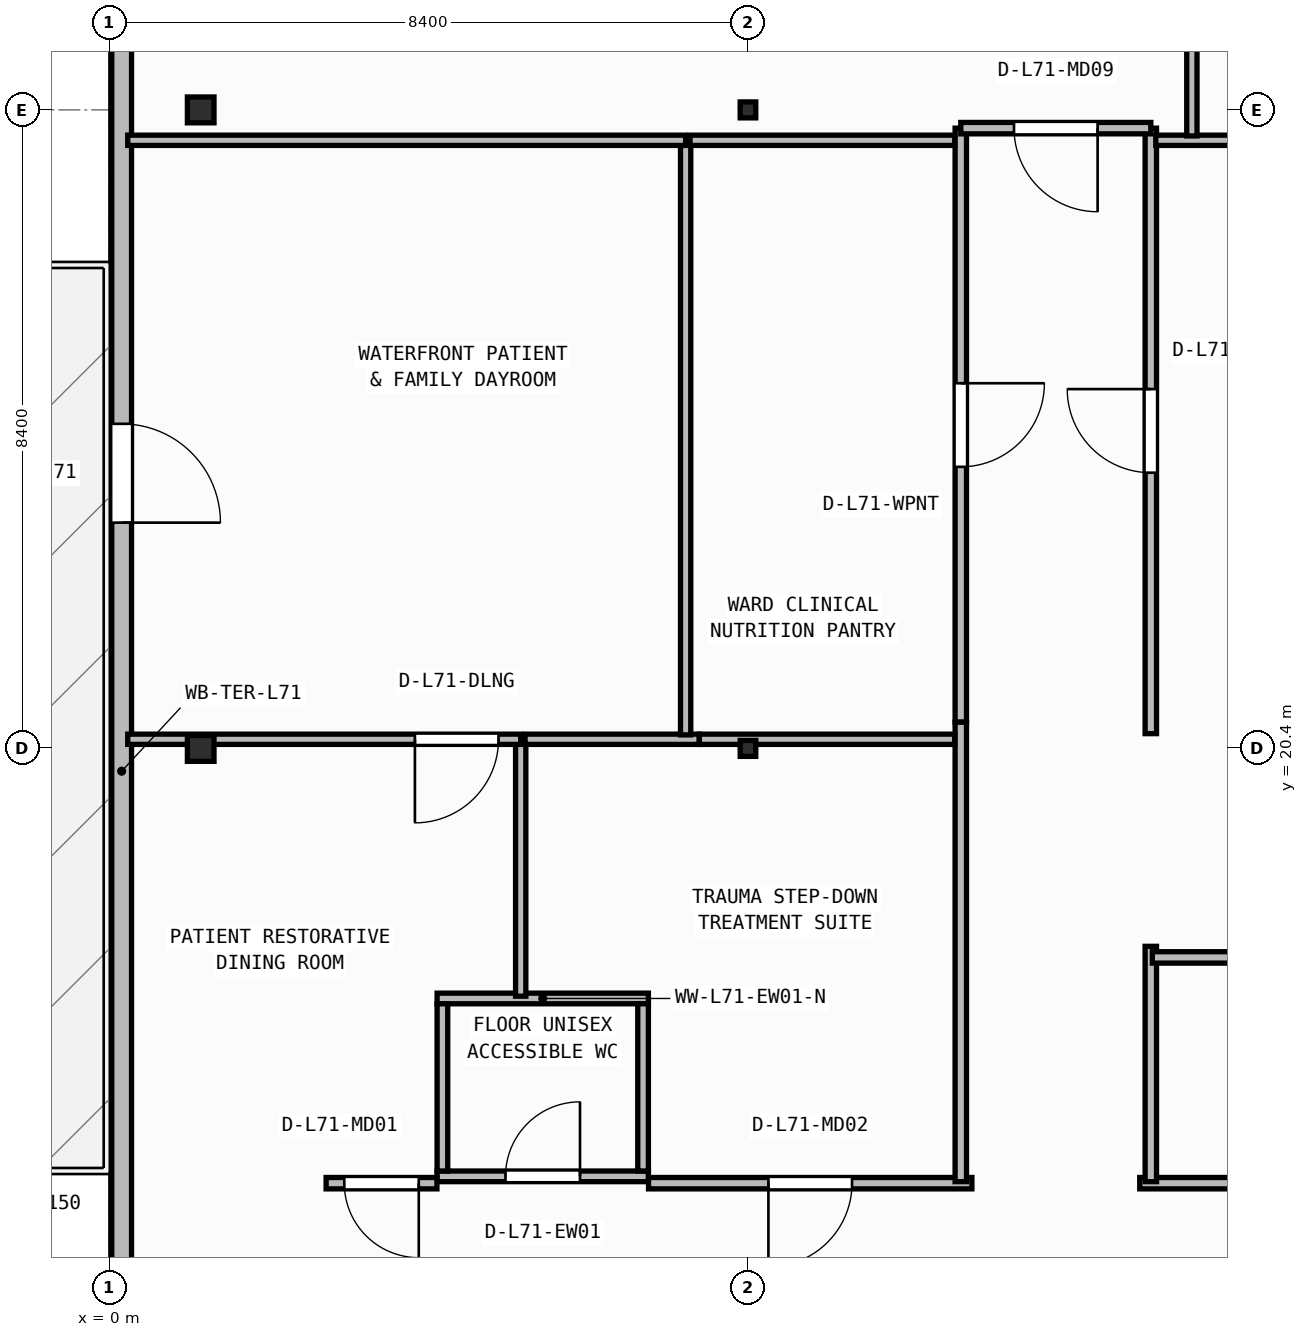
"""IFC4 building model, lengths in metres.
Left out: names, types, materials, properties, quantities, classifications, styles, units other than length and angle.
Written with IfcOpenShell. Run it as: python <this file> out.ifc"""

import sys

from ifc_helpers import new_model, si_unit, direction, frame, frame_2d, origin, origin_2d, place, context, subcontext, project, spatial, rectangle, i_section, extrude, element, fill, save


model = new_model("IFC4")
c1 = context("Model", 3, precision=1e-05, world=origin(), true_north=direction((0.0, 1.0)))
c2 = subcontext(c1, "Body", "Model", "MODEL_VIEW")
j1 = project(units=[si_unit("LENGTHUNIT", "METRE"), si_unit("PLANEANGLEUNIT", "RADIAN")], contexts=[c1])
p1 = place(None, origin())
s1 = spatial("IfcSite", under=j1, at=p1, CompositionType="ELEMENT")
p2 = place(p1, origin())
s2 = spatial("IfcBuilding", under=s1, at=p2, CompositionType="ELEMENT")
p3 = place(p2, frame((0.0, 0.0, 288.15)))
s3 = spatial("IfcBuildingStorey", under=s2, at=p3, CompositionType="ELEMENT", Elevation=288.15)
p4 = place(p3, frame((1.2, 20.4, 0.0), z_axis=(0.0, 0.0, 1.0), x_axis=(1.0, 0.0, 0.0)))
e1 = element("IfcColumn", 1, at=p4, inside=s3, PredefinedType="COLUMN", context=c2, shape_type="SweptSolid", body=[
    extrude(i_section(OverallWidth=0.35, OverallDepth=0.34, WebThickness=0.016, FlangeThickness=0.028, at=origin_2d()), origin(), (0.0, 0.0, 1.0), 3.95),
])
p5 = place(p3, frame((8.4, 20.4, 0.0), z_axis=(0.0, 0.0, 1.0), x_axis=(1.0, 0.0, 0.0)))
e2 = element("IfcColumn", 2, at=p5, inside=s3, PredefinedType="COLUMN", context=c2, shape_type="SweptSolid", body=[
    extrude(i_section(OverallWidth=0.205, OverallDepth=0.21, WebThickness=0.009, FlangeThickness=0.014, FilletRadius=0.011, at=origin_2d()), origin(), (0.0, 0.0, 1.0), 3.95),
])
p6 = place(p3, frame((1.2, 28.8, 0.0), z_axis=(0.0, 0.0, 1.0), x_axis=(1.0, 0.0, 0.0)))
e3 = element("IfcColumn", 3, at=p6, inside=s3, PredefinedType="COLUMN", context=c2, shape_type="SweptSolid", body=[
    extrude(i_section(OverallWidth=0.35, OverallDepth=0.34, WebThickness=0.016, FlangeThickness=0.028, at=origin_2d()), origin(), (0.0, 0.0, 1.0), 3.95),
])
p7 = place(p3, frame((8.4, 28.8, 0.0), z_axis=(0.0, 0.0, 1.0), x_axis=(1.0, 0.0, 0.0)))
e4 = element("IfcColumn", 4, at=p7, inside=s3, PredefinedType="COLUMN", context=c2, shape_type="SweptSolid", body=[
    extrude(i_section(OverallWidth=0.205, OverallDepth=0.21, WebThickness=0.009, FlangeThickness=0.014, FilletRadius=0.011, at=origin_2d()), origin(), (0.0, 0.0, 1.0), 3.95),
])
p8 = place(p3, frame((0.16, 37.74, 0.0), z_axis=(0.0, 0.0, 1.0), x_axis=(0.0, -1.0, 0.0)))
e5 = element("IfcWall", 5, at=p8, inside=s3, PredefinedType="STANDARD", context=c2, shape_type="SweptSolid", body=[
    extrude(rectangle(XDim=35.28, YDim=0.26, at=frame_2d((17.64, 0.0))), origin(), (0.0, 0.0, 1.0), 3.71),
])
p9 = place(p8, frame((13.07, 0.0, 0.0)))
e6 = element("IfcOpeningElement", 6, at=p9, cuts=e5, PredefinedType="OPENING", context=c2, shape_type="SweptSolid", body=[
    extrude(rectangle(XDim=1.3, YDim=2.15, at=frame_2d((0.65, 1.075))), frame((0.0, 0.14, 0.0), z_axis=(0.0, -1.0, 0.0), x_axis=(1.0, 0.0, 0.0)), (0.0, 0.0, 1.0), 0.28),
])
p10 = place(p3, frame((4.31, 14.77, 0.0), z_axis=(0.0, 0.0, 1.0), x_axis=(1.0, 0.0, 0.0)))
e7 = element("IfcWall", 7, at=p10, inside=s3, PredefinedType="PARTITIONING", context=c2, shape_type="SweptSolid", body=[
    extrude(rectangle(XDim=2.78, YDim=0.14, at=frame_2d((1.39, 0.0))), origin(), (0.0, 0.0, 1.0), 3.71),
])
p11 = place(p10, frame((0.9, 0.0, 0.0)))
e8 = element("IfcOpeningElement", 8, at=p11, cuts=e7, PredefinedType="OPENING", context=c2, shape_type="SweptSolid", body=[
    extrude(rectangle(XDim=0.98, YDim=2.1, at=frame_2d((0.49, 1.05))), frame((0.0, 0.08, 0.0), z_axis=(0.0, -1.0, 0.0), x_axis=(1.0, 0.0, 0.0)), (0.0, 0.0, 1.0), 0.16),
])
p12 = place(p3, frame((4.31, 17.11, 0.0), z_axis=(0.0, 0.0, 1.0), x_axis=(1.0, 0.0, 0.0)))
e9 = element("IfcWall", 9, at=p12, inside=s3, PredefinedType="PARTITIONING", context=c2, shape_type="SweptSolid", body=[
    extrude(rectangle(XDim=2.78, YDim=0.14, at=frame_2d((1.39, 0.0))), origin(), (0.0, 0.0, 1.0), 3.71),
])
for number, where, z_axis, x_axis in (
    (10, (4.38, 14.84, 0.0), (0.0, 0.0, 1.0), (0.0, 1.0, 0.0)),
    (11, (7.02, 14.84, 0.0), (0.0, 0.0, 1.0), (0.0, 1.0, 0.0)),
):
    element("IfcWall", number, at=place(p3, frame(where, z_axis=z_axis, x_axis=x_axis)), inside=s3, PredefinedType="PARTITIONING", context=c2, shape_type="SweptSolid", body=[
        extrude(rectangle(XDim=2.2, YDim=0.14, at=frame_2d((1.1, 0.0))), origin(), (0.0, 0.0, 1.0), 3.71),
    ])
p13 = place(p3, frame((4.308, 14.68, 0.0), z_axis=(0.0, 0.0, 1.0), x_axis=(-1.0, 0.0, 0.0)))
e12 = element("IfcWall", 12, at=p13, inside=s3, PredefinedType="PARTITIONING", context=c2, shape_type="SweptSolid", body=[
    extrude(rectangle(XDim=1.458, YDim=0.15, at=frame_2d((0.729, 0.0))), origin(), (0.0, 0.0, 1.0), 3.71),
])
p14 = place(p13, frame((0.239, 0.0, 0.0)))
e13 = element("IfcOpeningElement", 13, at=p14, cuts=e12, PredefinedType="OPENING", context=c2, shape_type="SweptSolid", body=[
    extrude(rectangle(XDim=0.98, YDim=2.1, at=frame_2d((0.49, 1.05))), frame((0.0, 0.085, 0.0), z_axis=(0.0, -1.0, 0.0), x_axis=(1.0, 0.0, 0.0)), (0.0, 0.0, 1.0), 0.17),
])
p15 = place(p3, frame((11.346, 14.68, 0.0), z_axis=(0.0, 0.0, 1.0), x_axis=(-1.0, 0.0, 0.0)))
e14 = element("IfcWall", 14, at=p15, inside=s3, PredefinedType="PARTITIONING", context=c2, shape_type="SweptSolid", body=[
    extrude(rectangle(XDim=4.254, YDim=0.15, at=frame_2d((2.127, 0.0))), origin(), (0.0, 0.0, 1.0), 3.71),
])
p16 = place(p15, frame((1.577, 0.0, 0.0)))
e15 = element("IfcOpeningElement", 15, at=p16, cuts=e14, PredefinedType="OPENING", context=c2, shape_type="SweptSolid", body=[
    extrude(rectangle(XDim=1.1, YDim=2.1, at=frame_2d((0.55, 1.05))), frame((0.0, 0.085, 0.0), z_axis=(0.0, -1.0, 0.0), x_axis=(1.0, 0.0, 0.0)), (0.0, 0.0, 1.0), 0.17),
])
p17 = place(p3, frame((19.906, 14.68, 0.0), z_axis=(0.0, 0.0, 1.0), x_axis=(-1.0, 0.0, 0.0)))
e16 = element("IfcWall", 16, at=p17, inside=s3, PredefinedType="PARTITIONING", context=c2, shape_type="SweptSolid", body=[
    extrude(rectangle(XDim=6.352, YDim=0.15, at=frame_2d((3.176, 0.0))), origin(), (0.0, 0.0, 1.0), 3.71),
])
p18 = place(p17, frame((2.626, 0.0, 0.0)))
e17 = element("IfcOpeningElement", 17, at=p18, cuts=e16, PredefinedType="OPENING", context=c2, shape_type="SweptSolid", body=[
    extrude(rectangle(XDim=1.1, YDim=2.1, at=frame_2d((0.55, 1.05))), frame((0.0, 0.085, 0.0), z_axis=(0.0, -1.0, 0.0), x_axis=(1.0, 0.0, 0.0)), (0.0, 0.0, 1.0), 0.17),
])
p19 = place(p3, frame((11.2, 20.746, 0.0), z_axis=(0.0, 0.0, 1.0), x_axis=(0.0, -1.0, 0.0)))
e18 = element("IfcWall", 18, at=p19, inside=s3, PredefinedType="PARTITIONING", context=c2, shape_type="SweptSolid", body=[
    extrude(rectangle(XDim=6.046, YDim=0.15, at=frame_2d((3.023, 0.0))), origin(), (0.0, 0.0, 1.0), 3.71),
])
p20 = place(p3, frame((13.7, 14.7, 0.0), z_axis=(0.0, 0.0, 1.0), x_axis=(0.0, 1.0, 0.0)))
e19 = element("IfcWall", 19, at=p20, inside=s3, PredefinedType="PARTITIONING", context=c2, shape_type="SweptSolid", body=[
    extrude(rectangle(XDim=3.096, YDim=0.15, at=frame_2d((1.548, 0.0))), origin(), (0.0, 0.0, 1.0), 3.71),
])
p21 = place(p3, frame((11.2, 28.56, 0.0), z_axis=(0.0, 0.0, 1.0), x_axis=(0.0, -1.0, 0.0)))
e20 = element("IfcWall", 20, at=p21, inside=s3, PredefinedType="PARTITIONING", context=c2, shape_type="SweptSolid", body=[
    extrude(rectangle(XDim=7.812, YDim=0.15, at=frame_2d((3.906, 0.0))), origin(), (0.0, 0.0, 1.0), 3.71),
])
p22 = place(p21, frame((3.356, 0.0, 0.0)))
e21 = element("IfcOpeningElement", 21, at=p22, cuts=e20, PredefinedType="OPENING", context=c2, shape_type="SweptSolid", body=[
    extrude(rectangle(XDim=1.1, YDim=2.1, at=frame_2d((0.55, 1.05))), frame((0.0, 0.085, 0.0), z_axis=(0.0, -1.0, 0.0), x_axis=(1.0, 0.0, 0.0)), (0.0, 0.0, 1.0), 0.17),
])
p23 = place(p3, frame((13.7, 20.594, 0.0), z_axis=(0.0, 0.0, 1.0), x_axis=(0.0, 1.0, 0.0)))
e22 = element("IfcWall", 22, at=p23, inside=s3, PredefinedType="PARTITIONING", context=c2, shape_type="SweptSolid", body=[
    extrude(rectangle(XDim=7.966, YDim=0.15, at=frame_2d((3.983, 0.0))), origin(), (0.0, 0.0, 1.0), 3.71),
])
p24 = place(p23, frame((3.433, 0.0, 0.0)))
e23 = element("IfcOpeningElement", 23, at=p24, cuts=e22, PredefinedType="OPENING", context=c2, shape_type="SweptSolid", body=[
    extrude(rectangle(XDim=1.1, YDim=2.1, at=frame_2d((0.55, 1.05))), frame((0.0, 0.085, 0.0), z_axis=(0.0, -1.0, 0.0), x_axis=(1.0, 0.0, 0.0)), (0.0, 0.0, 1.0), 0.17),
])
p25 = place(p3, frame((13.7, 28.56, 0.0), z_axis=(0.0, 0.0, 1.0), x_axis=(-1.0, 0.0, 0.0)))
e24 = element("IfcWall", 24, at=p25, inside=s3, PredefinedType="PARTITIONING", context=c2, shape_type="SweptSolid", body=[
    extrude(rectangle(XDim=2.5, YDim=0.15, at=frame_2d((1.25, 0.0))), origin(), (0.0, 0.0, 1.0), 3.157),
])
p26 = place(p25, frame((0.7, 0.0, 0.0)))
e25 = element("IfcOpeningElement", 25, at=p26, cuts=e24, PredefinedType="OPENING", context=c2, shape_type="SweptSolid", body=[
    extrude(rectangle(XDim=1.1, YDim=2.1, at=frame_2d((0.55, 1.05))), frame((0.0, 0.085, 0.0), z_axis=(0.0, -1.0, 0.0), x_axis=(1.0, 0.0, 0.0)), (0.0, 0.0, 1.0), 0.17),
])
p27 = place(p3, frame((13.72, 17.65, 0.0), z_axis=(0.0, 0.0, 1.0), x_axis=(1.0, 0.0, 0.0)))
e26 = element("IfcWall", 26, at=p27, inside=s3, PredefinedType="PARTITIONING", context=c2, shape_type="SweptSolid", body=[
    extrude(rectangle(XDim=6.186, YDim=0.15, at=frame_2d((3.093, 0.0))), origin(), (0.0, 0.0, 1.0), 3.71),
])
p28 = place(p3, frame((5.41, 17.14, 0.0), z_axis=(0.0, 0.0, 1.0), x_axis=(0.0, 1.0, 0.0)))
e27 = element("IfcWall", 27, at=p28, inside=s3, PredefinedType="PARTITIONING", context=c2, shape_type="SweptSolid", body=[
    extrude(rectangle(XDim=3.38, YDim=0.135, at=frame_2d((1.69, 0.0))), origin(), (0.0, 0.0, 1.0), 3.71),
])
p29 = place(p3, frame((5.41, 20.52, 0.0), z_axis=(0.0, 0.0, 1.0), x_axis=(-1.0, 0.0, 0.0)))
e28 = element("IfcWall", 28, at=p29, inside=s3, PredefinedType="PARTITIONING", context=c2, shape_type="SweptSolid", body=[
    extrude(rectangle(XDim=5.17, YDim=0.135, at=frame_2d((2.585, 0.0))), origin(), (0.0, 0.0, 1.0), 3.157),
])
p30 = place(p29, frame((0.292, 0.0, 0.0)))
e29 = element("IfcOpeningElement", 29, at=p30, cuts=e28, PredefinedType="OPENING", context=c2, shape_type="SweptSolid", body=[
    extrude(rectangle(XDim=1.1, YDim=2.1, at=frame_2d((0.55, 1.05))), frame((0.0, 0.077, 0.0), z_axis=(0.0, -1.0, 0.0), x_axis=(1.0, 0.0, 0.0)), (0.0, 0.0, 1.0), 0.155),
])
p31 = place(p3, frame((7.759, 20.52, 0.0), z_axis=(0.0, 0.0, 1.0), x_axis=(-1.0, 0.0, 0.0)))
e30 = element("IfcWall", 30, at=p31, inside=s3, PredefinedType="PARTITIONING", context=c2, shape_type="SweptSolid", body=[
    extrude(rectangle(XDim=2.291, YDim=0.135, at=frame_2d((1.146, 0.0))), origin(), (0.0, 0.0, 1.0), 3.157),
])
p32 = place(p3, frame((11.12, 20.52, 0.0), z_axis=(0.0, 0.0, 1.0), x_axis=(-1.0, 0.0, 0.0)))
e31 = element("IfcWall", 31, at=p32, inside=s3, PredefinedType="PARTITIONING", context=c2, shape_type="SweptSolid", body=[
    extrude(rectangle(XDim=3.36, YDim=0.135, at=frame_2d((1.68, 0.0))), origin(), (0.0, 0.0, 1.0), 3.157),
])
p33 = place(p3, frame((7.58, 20.577, 0.0), z_axis=(0.0, 0.0, 1.0), x_axis=(0.0, 1.0, 0.0)))
e32 = element("IfcWall", 32, at=p33, inside=s3, PredefinedType="PARTITIONING", context=c2, shape_type="SweptSolid", body=[
    extrude(rectangle(XDim=7.823, YDim=0.135, at=frame_2d((3.911, 0.0))), origin(), (0.0, 0.0, 1.0), 3.71),
])
p34 = place(p3, frame((7.58, 28.4, 0.0), z_axis=(0.0, 0.0, 1.0), x_axis=(-1.0, 0.0, 0.0)))
e33 = element("IfcWall", 33, at=p34, inside=s3, PredefinedType="PARTITIONING", context=c2, shape_type="SweptSolid", body=[
    extrude(rectangle(XDim=7.34, YDim=0.135, at=frame_2d((3.67, 0.0))), origin(), (0.0, 0.0, 1.0), 3.157),
])
p35 = place(p3, frame((11.12, 28.4, 0.0), z_axis=(0.0, 0.0, 1.0), x_axis=(-1.0, 0.0, 0.0)))
e34 = element("IfcWall", 34, at=p35, inside=s3, PredefinedType="PARTITIONING", context=c2, shape_type="SweptSolid", body=[
    extrude(rectangle(XDim=3.483, YDim=0.135, at=frame_2d((1.741, 0.0))), origin(), (0.0, 0.0, 1.0), 3.157),
])
p36 = place(p3, frame((20.319, 28.4, 0.0), z_axis=(0.0, 0.0, 1.0), x_axis=(-1.0, 0.0, 0.0)))
e35 = element("IfcWall", 35, at=p36, inside=s3, PredefinedType="PARTITIONING", context=c2, shape_type="SweptSolid", body=[
    extrude(rectangle(XDim=6.554, YDim=0.135, at=frame_2d((3.277, 0.0))), origin(), (0.0, 0.0, 1.0), 3.157),
])
p37 = place(p36, frame((0.326, 0.0, 0.0)))
e36 = element("IfcOpeningElement", 36, at=p37, cuts=e35, PredefinedType="OPENING", context=c2, shape_type="SweptSolid", body=[
    extrude(rectangle(XDim=1.1, YDim=2.1, at=frame_2d((0.55, 1.05))), frame((0.0, 0.077, 0.0), z_axis=(0.0, -1.0, 0.0), x_axis=(1.0, 0.0, 0.0)), (0.0, 0.0, 1.0), 0.155),
])
p38 = place(p3, frame((14.24, 28.458, 0.0), z_axis=(0.0, 0.0, 1.0), x_axis=(0.0, 1.0, 0.0)))
e37 = element("IfcWall", 37, at=p38, inside=s3, PredefinedType="PARTITIONING", context=c2, shape_type="SweptSolid", body=[
    extrude(rectangle(XDim=4.294, YDim=0.135, at=frame_2d((2.147, 0.0))), origin(), (0.0, 0.0, 1.0), 3.71),
])
p39 = place(p9, origin())
e38 = element("IfcDoor", 38, at=p39, inside=s3, OperationType="SINGLE_SWING_RIGHT", PredefinedType="DOOR", context=c2, shape_type="SweptSolid", body=[
    extrude(rectangle(XDim=1.3, YDim=2.15, at=frame_2d((0.65, 1.075))), frame((0.0, 0.025, 0.0), z_axis=(0.0, -1.0, 0.0), x_axis=(1.0, 0.0, 0.0)), (0.0, 0.0, 1.0), 0.05),
])
fill(e6, e38)
p40 = place(p11, origin())
e39 = element("IfcDoor", 39, at=p40, inside=s3, OperationType="SINGLE_SWING_RIGHT", PredefinedType="DOOR", context=c2, shape_type="SweptSolid", body=[
    extrude(rectangle(XDim=0.98, YDim=2.1, at=frame_2d((0.49, 1.05))), frame((0.0, 0.025, 0.0), z_axis=(0.0, -1.0, 0.0), x_axis=(1.0, 0.0, 0.0)), (0.0, 0.0, 1.0), 0.05),
])
fill(e8, e39)
p41 = place(p14, origin())
e40 = element("IfcDoor", 40, at=p41, inside=s3, OperationType="SINGLE_SWING_LEFT", PredefinedType="DOOR", context=c2, shape_type="SweptSolid", body=[
    extrude(rectangle(XDim=0.98, YDim=2.1, at=frame_2d((0.49, 1.05))), frame((0.0, 0.025, 0.0), z_axis=(0.0, -1.0, 0.0), x_axis=(1.0, 0.0, 0.0)), (0.0, 0.0, 1.0), 0.05),
])
fill(e13, e40)
p42 = place(p16, origin())
e41 = element("IfcDoor", 41, at=p42, inside=s3, OperationType="SINGLE_SWING_RIGHT", PredefinedType="DOOR", context=c2, shape_type="SweptSolid", body=[
    extrude(rectangle(XDim=1.1, YDim=2.1, at=frame_2d((0.55, 1.05))), frame((0.0, 0.025, 0.0), z_axis=(0.0, -1.0, 0.0), x_axis=(1.0, 0.0, 0.0)), (0.0, 0.0, 1.0), 0.05),
])
fill(e15, e41)
p43 = place(p22, origin())
e42 = element("IfcDoor", 42, at=p43, inside=s3, OperationType="SINGLE_SWING_LEFT", PredefinedType="DOOR", context=c2, shape_type="SweptSolid", body=[
    extrude(rectangle(XDim=1.1, YDim=2.1, at=frame_2d((0.55, 1.05))), frame((0.0, 0.025, 0.0), z_axis=(0.0, -1.0, 0.0), x_axis=(1.0, 0.0, 0.0)), (0.0, 0.0, 1.0), 0.05),
])
fill(e21, e42)
p44 = place(p24, origin())
e43 = element("IfcDoor", 43, at=p44, inside=s3, OperationType="SINGLE_SWING_RIGHT", PredefinedType="DOOR", context=c2, shape_type="SweptSolid", body=[
    extrude(rectangle(XDim=1.1, YDim=2.1, at=frame_2d((0.55, 1.05))), frame((0.0, 0.025, 0.0), z_axis=(0.0, -1.0, 0.0), x_axis=(1.0, 0.0, 0.0)), (0.0, 0.0, 1.0), 0.05),
])
fill(e23, e43)
p45 = place(p26, origin())
e44 = element("IfcDoor", 44, at=p45, inside=s3, OperationType="SINGLE_SWING_LEFT", PredefinedType="DOOR", context=c2, shape_type="SweptSolid", body=[
    extrude(rectangle(XDim=1.1, YDim=2.1, at=frame_2d((0.55, 1.05))), frame((0.0, 0.025, 0.0), z_axis=(0.0, -1.0, 0.0), x_axis=(1.0, 0.0, 0.0)), (0.0, 0.0, 1.0), 0.05),
])
fill(e25, e44)
p46 = place(p30, origin())
e45 = element("IfcDoor", 45, at=p46, inside=s3, OperationType="SINGLE_SWING_RIGHT", PredefinedType="DOOR", context=c2, shape_type="SweptSolid", body=[
    extrude(rectangle(XDim=1.1, YDim=2.1, at=frame_2d((0.55, 1.05))), frame((0.0, 0.025, 0.0), z_axis=(0.0, -1.0, 0.0), x_axis=(1.0, 0.0, 0.0)), (0.0, 0.0, 1.0), 0.05),
])
fill(e29, e45)
save(model, sys.argv[1])
